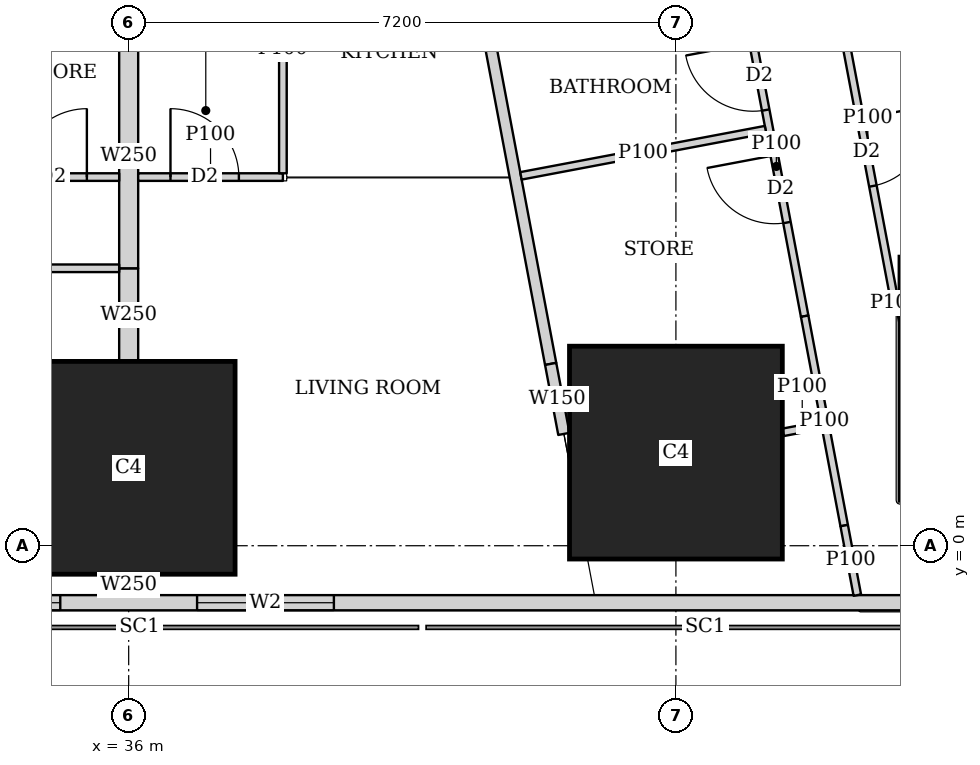
"""IFC4 building model, lengths in metres.
Left out: names, types, materials, properties, quantities, classifications, styles, units other than length and angle.
Written with IfcOpenShell. Run it as: python <this file> out.ifc"""

import sys

from ifc_helpers import new_model, si_unit, direction, frame, frame_2d, origin, origin_2d, place, context, subcontext, project, spatial, rectangle, extrude, element, fill, save


model = new_model("IFC4")
c1 = context("Model", 3, precision=1e-05, world=origin(), true_north=direction((0.0, 1.0)))
c2 = subcontext(c1, "Body", "Model", "MODEL_VIEW")
j1 = project(units=[si_unit("LENGTHUNIT", "METRE"), si_unit("PLANEANGLEUNIT", "RADIAN")], contexts=[c1])
p1 = place(None, origin())
s1 = spatial("IfcSite", under=j1, at=p1, CompositionType="ELEMENT")
p2 = place(p1, origin())
s2 = spatial("IfcBuilding", under=s1, at=p2, CompositionType="ELEMENT")
p3 = place(p2, frame((0.0, 0.0, 31.25)))
s3 = spatial("IfcBuildingStorey", under=s2, at=p3, CompositionType="ELEMENT", Elevation=31.25)
for number, where, z_axis, x_axis in (
    (1, (36.0, 1.025, 0.0), (0.0, 0.0, 1.0), (1.0, 0.0, 0.0)),
    (2, (43.2, 1.225, 0.0), (0.0, 0.0, 1.0), (1.0, 0.0, 0.0)),
):
    element("IfcColumn", number, at=place(p3, frame(where, z_axis=z_axis, x_axis=x_axis)), inside=s3, PredefinedType="COLUMN", context=c2, shape_type="SweptSolid", body=[
        extrude(rectangle(XDim=2.8, YDim=2.8, at=origin_2d()), origin(), (0.0, 0.0, 1.0), 3.75),
    ])
p4 = place(p3, frame((47.748, 2.197, 0.0), z_axis=(0.0, 0.0, 1.0), x_axis=(1.0, 0.0, 0.0)))
e3 = element("IfcColumn", 3, at=p4, inside=s3, PredefinedType="COLUMN", context=c2, shape_type="SweptSolid", body=[
    extrude(rectangle(XDim=3.2, YDim=3.2, at=origin_2d()), origin(), (0.0, 0.0, 1.0), 3.75),
])
p5 = place(p3, frame((2.163, -0.75, 0.0), z_axis=(0.0, 0.0, 1.0), x_axis=(1.0, 0.0, 0.0)))
e4 = element("IfcWall", 4, at=p5, inside=s3, PredefinedType="SOLIDWALL", context=c2, shape_type="SweptSolid", body=[
    extrude(rectangle(XDim=45.628, YDim=0.2, at=frame_2d((22.814, 0.0))), origin(), (0.0, 0.0, 1.0), 3.5),
])
p6 = place(p5, frame((9.537, 0.0, 0.9)))
e5 = element("IfcOpeningElement", 5, at=p6, cuts=e4, PredefinedType="OPENING", context=c2, shape_type="SweptSolid", body=[
    extrude(rectangle(XDim=1.8, YDim=1.5, at=frame_2d((0.9, 0.75))), frame((0.0, 0.11, 0.0), z_axis=(0.0, -1.0, 0.0), x_axis=(1.0, 0.0, 0.0)), (0.0, 0.0, 1.0), 0.22),
])
p7 = place(p5, frame((13.137, 0.0, 0.9)))
e6 = element("IfcOpeningElement", 6, at=p7, cuts=e4, PredefinedType="OPENING", context=c2, shape_type="SweptSolid", body=[
    extrude(rectangle(XDim=1.8, YDim=1.5, at=frame_2d((0.9, 0.75))), frame((0.0, 0.11, 0.0), z_axis=(0.0, -1.0, 0.0), x_axis=(1.0, 0.0, 0.0)), (0.0, 0.0, 1.0), 0.22),
])
p8 = place(p5, frame((16.737, 0.0, 0.9)))
e7 = element("IfcOpeningElement", 7, at=p8, cuts=e4, PredefinedType="OPENING", context=c2, shape_type="SweptSolid", body=[
    extrude(rectangle(XDim=1.8, YDim=1.5, at=frame_2d((0.9, 0.75))), frame((0.0, 0.11, 0.0), z_axis=(0.0, -1.0, 0.0), x_axis=(1.0, 0.0, 0.0)), (0.0, 0.0, 1.0), 0.22),
])
p9 = place(p5, frame((20.337, 0.0, 0.9)))
e8 = element("IfcOpeningElement", 8, at=p9, cuts=e4, PredefinedType="OPENING", context=c2, shape_type="SweptSolid", body=[
    extrude(rectangle(XDim=1.8, YDim=1.5, at=frame_2d((0.9, 0.75))), frame((0.0, 0.11, 0.0), z_axis=(0.0, -1.0, 0.0), x_axis=(1.0, 0.0, 0.0)), (0.0, 0.0, 1.0), 0.22),
])
p10 = place(p5, frame((23.937, 0.0, 0.9)))
e9 = element("IfcOpeningElement", 9, at=p10, cuts=e4, PredefinedType="OPENING", context=c2, shape_type="SweptSolid", body=[
    extrude(rectangle(XDim=1.8, YDim=1.5, at=frame_2d((0.9, 0.75))), frame((0.0, 0.11, 0.0), z_axis=(0.0, -1.0, 0.0), x_axis=(1.0, 0.0, 0.0)), (0.0, 0.0, 1.0), 0.22),
])
p11 = place(p5, frame((27.537, 0.0, 0.9)))
e10 = element("IfcOpeningElement", 10, at=p11, cuts=e4, PredefinedType="OPENING", context=c2, shape_type="SweptSolid", body=[
    extrude(rectangle(XDim=1.8, YDim=1.5, at=frame_2d((0.9, 0.75))), frame((0.0, 0.11, 0.0), z_axis=(0.0, -1.0, 0.0), x_axis=(1.0, 0.0, 0.0)), (0.0, 0.0, 1.0), 0.22),
])
p12 = place(p5, frame((31.137, 0.0, 0.9)))
e11 = element("IfcOpeningElement", 11, at=p12, cuts=e4, PredefinedType="OPENING", context=c2, shape_type="SweptSolid", body=[
    extrude(rectangle(XDim=1.8, YDim=1.5, at=frame_2d((0.9, 0.75))), frame((0.0, 0.11, 0.0), z_axis=(0.0, -1.0, 0.0), x_axis=(1.0, 0.0, 0.0)), (0.0, 0.0, 1.0), 0.22),
])
p13 = place(p5, frame((34.737, 0.0, 0.9)))
e12 = element("IfcOpeningElement", 12, at=p13, cuts=e4, PredefinedType="OPENING", context=c2, shape_type="SweptSolid", body=[
    extrude(rectangle(XDim=1.8, YDim=1.5, at=frame_2d((0.9, 0.75))), frame((0.0, 0.11, 0.0), z_axis=(0.0, -1.0, 0.0), x_axis=(1.0, 0.0, 0.0)), (0.0, 0.0, 1.0), 0.22),
])
p14 = place(p3, frame((50.653, 2.703, 0.0), z_axis=(0.0, 0.0, 1.0), x_axis=(-0.185612026696, 0.982623109613, 0.0)))
e13 = element("IfcWall", 13, at=p14, inside=s3, PredefinedType="SOLIDWALL", context=c2, shape_type="SweptSolid", body=[
    extrude(rectangle(XDim=41.393, YDim=0.2, at=frame_2d((20.697, 0.0))), origin(), (0.0, 0.0, 1.0), 3.5),
])
p15 = place(p14, frame((1.633, 0.0, 0.9)))
e14 = element("IfcOpeningElement", 14, at=p15, cuts=e13, PredefinedType="OPENING", context=c2, shape_type="SweptSolid", body=[
    extrude(rectangle(XDim=1.8, YDim=1.5, at=frame_2d((0.9, 0.75))), frame((0.0, 0.11, 0.0), z_axis=(0.0, -1.0, 0.0), x_axis=(1.0, 0.0, 0.0)), (0.0, 0.0, 1.0), 0.22),
])
p16 = place(p14, frame((6.032, 0.0, 0.9)))
e15 = element("IfcOpeningElement", 15, at=p16, cuts=e13, PredefinedType="OPENING", context=c2, shape_type="SweptSolid", body=[
    extrude(rectangle(XDim=1.8, YDim=1.5, at=frame_2d((0.9, 0.75))), frame((0.0, 0.11, 0.0), z_axis=(0.0, -1.0, 0.0), x_axis=(1.0, 0.0, 0.0)), (0.0, 0.0, 1.0), 0.22),
])
p17 = place(p14, frame((9.848, 0.0, 0.9)))
e16 = element("IfcOpeningElement", 16, at=p17, cuts=e13, PredefinedType="OPENING", context=c2, shape_type="SweptSolid", body=[
    extrude(rectangle(XDim=1.8, YDim=1.5, at=frame_2d((0.9, 0.75))), frame((0.0, 0.11, 0.0), z_axis=(0.0, -1.0, 0.0), x_axis=(1.0, 0.0, 0.0)), (0.0, 0.0, 1.0), 0.22),
])
p18 = place(p14, frame((17.481, 0.0, 0.9)))
e17 = element("IfcOpeningElement", 17, at=p18, cuts=e13, PredefinedType="OPENING", context=c2, shape_type="SweptSolid", body=[
    extrude(rectangle(XDim=1.8, YDim=1.5, at=frame_2d((0.9, 0.75))), frame((0.0, 0.11, 0.0), z_axis=(0.0, -1.0, 0.0), x_axis=(1.0, 0.0, 0.0)), (0.0, 0.0, 1.0), 0.22),
])
p19 = place(p14, frame((21.297, 0.0, 0.9)))
e18 = element("IfcOpeningElement", 18, at=p19, cuts=e13, PredefinedType="OPENING", context=c2, shape_type="SweptSolid", body=[
    extrude(rectangle(XDim=1.8, YDim=1.5, at=frame_2d((0.9, 0.75))), frame((0.0, 0.11, 0.0), z_axis=(0.0, -1.0, 0.0), x_axis=(1.0, 0.0, 0.0)), (0.0, 0.0, 1.0), 0.22),
])
p20 = place(p14, frame((25.113, 0.0, 0.9)))
e19 = element("IfcOpeningElement", 19, at=p20, cuts=e13, PredefinedType="OPENING", context=c2, shape_type="SweptSolid", body=[
    extrude(rectangle(XDim=1.8, YDim=1.5, at=frame_2d((0.9, 0.75))), frame((0.0, 0.11, 0.0), z_axis=(0.0, -1.0, 0.0), x_axis=(1.0, 0.0, 0.0)), (0.0, 0.0, 1.0), 0.22),
])
p21 = place(p14, frame((28.93, 0.0, 0.9)))
e20 = element("IfcOpeningElement", 20, at=p21, cuts=e13, PredefinedType="OPENING", context=c2, shape_type="SweptSolid", body=[
    extrude(rectangle(XDim=1.8, YDim=1.5, at=frame_2d((0.9, 0.75))), frame((0.0, 0.11, 0.0), z_axis=(0.0, -1.0, 0.0), x_axis=(1.0, 0.0, 0.0)), (0.0, 0.0, 1.0), 0.22),
])
p22 = place(p14, frame((32.746, 0.0, 0.9)))
e21 = element("IfcOpeningElement", 21, at=p22, cuts=e13, PredefinedType="OPENING", context=c2, shape_type="SweptSolid", body=[
    extrude(rectangle(XDim=1.8, YDim=1.5, at=frame_2d((0.9, 0.75))), frame((0.0, 0.11, 0.0), z_axis=(0.0, -1.0, 0.0), x_axis=(1.0, 0.0, 0.0)), (0.0, 0.0, 1.0), 0.22),
])
p23 = place(p14, frame((36.481, 0.0, 0.9)))
e22 = element("IfcOpeningElement", 22, at=p23, cuts=e13, PredefinedType="OPENING", context=c2, shape_type="SweptSolid", body=[
    extrude(rectangle(XDim=1.8, YDim=1.5, at=frame_2d((0.9, 0.75))), frame((0.0, 0.11, 0.0), z_axis=(0.0, -1.0, 0.0), x_axis=(1.0, 0.0, 0.0)), (0.0, 0.0, 1.0), 0.22),
])
p24 = place(p3, frame((35.094, 36.585, 0.0), z_axis=(0.0, 0.0, 1.0), x_axis=(0.185588860311, -0.982627485331, 0.0)))
e23 = element("IfcWall", 23, at=p24, inside=s3, PredefinedType="SOLIDWALL", context=c2, shape_type="SweptSolid", body=[
    extrude(rectangle(XDim=34.797, YDim=0.15, at=frame_2d((17.399, 0.0))), origin(), (0.0, 0.0, 1.0), 2.5),
])
p25 = place(p24, frame((6.012, 0.0, 0.0)))
e24 = element("IfcOpeningElement", 24, at=p25, cuts=e23, PredefinedType="OPENING", context=c2, shape_type="SweptSolid", body=[
    extrude(rectangle(XDim=1.0, YDim=2.1, at=frame_2d((0.5, 1.05))), frame((0.0, 0.085, 0.0), z_axis=(0.0, -1.0, 0.0), x_axis=(1.0, 0.0, 0.0)), (0.0, 0.0, 1.0), 0.17),
])
p26 = place(p24, frame((9.828, 0.0, 0.0)))
e25 = element("IfcOpeningElement", 25, at=p26, cuts=e23, PredefinedType="OPENING", context=c2, shape_type="SweptSolid", body=[
    extrude(rectangle(XDim=1.0, YDim=2.1, at=frame_2d((0.5, 1.05))), frame((0.0, 0.085, 0.0), z_axis=(0.0, -1.0, 0.0), x_axis=(1.0, 0.0, 0.0)), (0.0, 0.0, 1.0), 0.17),
])
p27 = place(p24, frame((25.9, 0.0, 0.0)))
e26 = element("IfcOpeningElement", 26, at=p27, cuts=e23, PredefinedType="OPENING", context=c2, shape_type="SweptSolid", body=[
    extrude(rectangle(XDim=1.0, YDim=2.1, at=frame_2d((0.5, 1.05))), frame((0.0, 0.085, 0.0), z_axis=(0.0, -1.0, 0.0), x_axis=(1.0, 0.0, 0.0)), (0.0, 0.0, 1.0), 0.17),
])
p28 = place(p3, frame((41.552, 2.392, 0.0), z_axis=(0.0, 0.0, 1.0), x_axis=(0.185687800081, -0.982608793417, 0.0)))
e27 = element("IfcWall", 27, at=p28, inside=s3, PredefinedType="SOLIDWALL", context=c2, shape_type="SweptSolid", body=[
    extrude(rectangle(XDim=0.938, YDim=0.15, at=frame_2d((0.469, 0.0))), origin(), (0.0, 0.0, 1.0), 2.05),
])
p29 = place(p3, frame((35.875, 3.65, 0.0), z_axis=(0.0, 0.0, 1.0), x_axis=(-1.0, 0.0, 0.0)))
e28 = element("IfcWall", 28, at=p29, inside=s3, PredefinedType="PARTITIONING", context=c2, shape_type="SweptSolid", body=[
    extrude(rectangle(XDim=7.075, YDim=0.1, at=frame_2d((3.538, 0.0))), origin(), (0.0, 0.0, 1.0), 3.5),
])
p30 = place(p29, frame((4.75, 0.0, 0.0)))
e29 = element("IfcOpeningElement", 29, at=p30, cuts=e28, PredefinedType="OPENING", context=c2, shape_type="SweptSolid", body=[
    extrude(rectangle(XDim=0.9, YDim=2.1, at=frame_2d((0.45, 1.05))), frame((0.0, 0.06, 0.0), z_axis=(0.0, -1.0, 0.0), x_axis=(1.0, 0.0, 0.0)), (0.0, 0.0, 1.0), 0.12),
])
p31 = place(p29, frame((2.375, 0.0, 0.0)))
e30 = element("IfcOpeningElement", 30, at=p31, cuts=e28, PredefinedType="OPENING", context=c2, shape_type="SweptSolid", body=[
    extrude(rectangle(XDim=0.9, YDim=2.1, at=frame_2d((0.45, 1.05))), frame((0.0, 0.06, 0.0), z_axis=(0.0, -1.0, 0.0), x_axis=(1.0, 0.0, 0.0)), (0.0, 0.0, 1.0), 0.12),
])
p32 = place(p3, frame((35.875, 4.85, 0.0), z_axis=(0.0, 0.0, 1.0), x_axis=(-1.0, 0.0, 0.0)))
e31 = element("IfcWall", 31, at=p32, inside=s3, PredefinedType="PARTITIONING", context=c2, shape_type="SweptSolid", body=[
    extrude(rectangle(XDim=7.075, YDim=0.1, at=frame_2d((3.538, 0.0))), origin(), (0.0, 0.0, 1.0), 3.5),
])
p33 = place(p32, frame((5.52, 0.0, 0.0)))
e32 = element("IfcOpeningElement", 32, at=p33, cuts=e31, PredefinedType="OPENING", context=c2, shape_type="SweptSolid", body=[
    extrude(rectangle(XDim=0.9, YDim=2.1, at=frame_2d((0.45, 1.05))), frame((0.0, 0.06, 0.0), z_axis=(0.0, -1.0, 0.0), x_axis=(1.0, 0.0, 0.0)), (0.0, 0.0, 1.0), 0.12),
])
p34 = place(p32, frame((2.225, 0.0, 0.0)))
e33 = element("IfcOpeningElement", 33, at=p34, cuts=e31, PredefinedType="OPENING", context=c2, shape_type="SweptSolid", body=[
    extrude(rectangle(XDim=0.9, YDim=2.1, at=frame_2d((0.45, 1.05))), frame((0.0, 0.06, 0.0), z_axis=(0.0, -1.0, 0.0), x_axis=(1.0, 0.0, 0.0)), (0.0, 0.0, 1.0), 0.12),
])
p35 = place(p32, frame((3.72, 0.0, 0.0)))
e34 = element("IfcOpeningElement", 34, at=p35, cuts=e31, PredefinedType="OPENING", context=c2, shape_type="SweptSolid", body=[
    extrude(rectangle(XDim=0.9, YDim=2.1, at=frame_2d((0.45, 1.05))), frame((0.0, 0.06, 0.0), z_axis=(0.0, -1.0, 0.0), x_axis=(1.0, 0.0, 0.0)), (0.0, 0.0, 1.0), 0.12),
])
p36 = place(p32, frame((0.425, 0.0, 0.0)))
e35 = element("IfcOpeningElement", 35, at=p36, cuts=e31, PredefinedType="OPENING", context=c2, shape_type="SweptSolid", body=[
    extrude(rectangle(XDim=0.9, YDim=2.1, at=frame_2d((0.45, 1.05))), frame((0.0, 0.06, 0.0), z_axis=(0.0, -1.0, 0.0), x_axis=(1.0, 0.0, 0.0)), (0.0, 0.0, 1.0), 0.12),
])
p37 = place(p3, frame((38.029, 4.85, 0.0), z_axis=(0.0, 0.0, 1.0), x_axis=(-1.0, 0.0, 0.0)))
e36 = element("IfcWall", 36, at=p37, inside=s3, PredefinedType="PARTITIONING", context=c2, shape_type="SweptSolid", body=[
    extrude(rectangle(XDim=1.904, YDim=0.1, at=frame_2d((0.952, 0.0))), origin(), (0.0, 0.0, 1.0), 3.5),
])
p38 = place(p37, frame((0.579, 0.0, 0.0)))
e37 = element("IfcOpeningElement", 37, at=p38, cuts=e36, PredefinedType="OPENING", context=c2, shape_type="SweptSolid", body=[
    extrude(rectangle(XDim=0.9, YDim=2.1, at=frame_2d((0.45, 1.05))), frame((0.0, 0.06, 0.0), z_axis=(0.0, -1.0, 0.0), x_axis=(1.0, 0.0, 0.0)), (0.0, 0.0, 1.0), 0.12),
])
p39 = place(p3, frame((38.029, 4.9, 0.0), z_axis=(0.0, 0.0, 1.0), x_axis=(0.0, 1.0, 0.0)))
e38 = element("IfcWall", 38, at=p39, inside=s3, PredefinedType="PARTITIONING", context=c2, shape_type="SweptSolid", body=[
    extrude(rectangle(XDim=3.275, YDim=0.1, at=frame_2d((1.638, 0.0))), origin(), (0.0, 0.0, 1.0), 3.5),
])
p40 = place(p3, frame((36.0, -0.65, 0.0), z_axis=(0.0, 0.0, 1.0), x_axis=(0.0, 1.0, 0.0)))
e39 = element("IfcWall", 39, at=p40, inside=s3, PredefinedType="SOLIDWALL", context=c2, shape_type="SweptSolid", body=[
    extrude(rectangle(XDim=0.274, YDim=0.25, at=frame_2d((0.137, 0.0))), origin(), (0.0, 0.0, 1.0), 3.5),
])
p41 = place(p3, frame((36.0, 2.426, 0.0), z_axis=(0.0, 0.0, 1.0), x_axis=(0.0, 1.0, 0.0)))
e40 = element("IfcWall", 40, at=p41, inside=s3, PredefinedType="SOLIDWALL", context=c2, shape_type="SweptSolid", body=[
    extrude(rectangle(XDim=1.224, YDim=0.25, at=frame_2d((0.612, 0.0))), origin(), (0.0, 0.0, 1.0), 3.5),
])
p42 = place(p3, frame((36.0, 3.65, 0.0), z_axis=(0.0, 0.0, 1.0), x_axis=(0.0, 1.0, 0.0)))
e41 = element("IfcWall", 41, at=p42, inside=s3, PredefinedType="SOLIDWALL", context=c2, shape_type="SweptSolid", body=[
    extrude(rectangle(XDim=2.949, YDim=0.25, at=frame_2d((1.475, 0.0))), origin(), (0.0, 0.0, 1.0), 3.5),
])
p43 = place(p3, frame((45.383, 6.894, 0.0), z_axis=(0.0, 0.0, 1.0), x_axis=(0.185791461635, -0.982589198385, 0.0)))
e42 = element("IfcWall", 42, at=p43, inside=s3, PredefinedType="PARTITIONING", context=c2, shape_type="SweptSolid", body=[
    extrude(rectangle(XDim=3.687, YDim=0.1, at=frame_2d((1.844, 0.0))), origin(), (0.0, 0.0, 1.0), 3.5),
])
p44 = place(p43, frame((1.3, 0.0, 0.0)))
e43 = element("IfcOpeningElement", 43, at=p44, cuts=e42, PredefinedType="OPENING", context=c2, shape_type="SweptSolid", body=[
    extrude(rectangle(XDim=0.9, YDim=2.1, at=frame_2d((0.45, 1.05))), frame((0.0, 0.06, 0.0), z_axis=(0.0, -1.0, 0.0), x_axis=(1.0, 0.0, 0.0)), (0.0, 0.0, 1.0), 0.12),
])
p45 = place(p3, frame((46.068, 3.271, 0.0), z_axis=(0.0, 0.0, 1.0), x_axis=(0.183590240121, -0.98300286049, 0.0)))
e44 = element("IfcWall", 44, at=p45, inside=s3, PredefinedType="PARTITIONING", context=c2, shape_type="SweptSolid", body=[
    extrude(rectangle(XDim=0.169, YDim=0.1, at=frame_2d((0.084, 0.0))), origin(), (0.0, 0.0, 1.0), 2.05),
])
p46 = place(p3, frame((44.149, 6.96, 0.0), z_axis=(0.0, 0.0, 1.0), x_axis=(0.185824941804, -0.982582867245, 0.0)))
e45 = element("IfcWall", 45, at=p46, inside=s3, PredefinedType="PARTITIONING", context=c2, shape_type="SweptSolid", body=[
    extrude(rectangle(XDim=4.01, YDim=0.1, at=frame_2d((2.005, 0.0))), origin(), (0.0, 0.0, 1.0), 3.5),
])
p47 = place(p46, frame((0.35, 0.0, 0.0)))
e46 = element("IfcOpeningElement", 46, at=p47, cuts=e45, PredefinedType="OPENING", context=c2, shape_type="SweptSolid", body=[
    extrude(rectangle(XDim=0.9, YDim=2.1, at=frame_2d((0.45, 1.05))), frame((0.0, 0.06, 0.0), z_axis=(0.0, -1.0, 0.0), x_axis=(1.0, 0.0, 0.0)), (0.0, 0.0, 1.0), 0.12),
])
p48 = place(p46, frame((1.856, 0.0, 0.0)))
e47 = element("IfcOpeningElement", 47, at=p48, cuts=e45, PredefinedType="OPENING", context=c2, shape_type="SweptSolid", body=[
    extrude(rectangle(XDim=0.9, YDim=2.1, at=frame_2d((0.45, 1.05))), frame((0.0, 0.06, 0.0), z_axis=(0.0, -1.0, 0.0), x_axis=(1.0, 0.0, 0.0)), (0.0, 0.0, 1.0), 0.12),
])
p49 = place(p3, frame((44.894, 3.02, 0.0), z_axis=(0.0, 0.0, 1.0), x_axis=(0.185471317237, -0.982649678412, 0.0)))
e48 = element("IfcWall", 48, at=p49, inside=s3, PredefinedType="PARTITIONING", context=c2, shape_type="SweptSolid", body=[
    extrude(rectangle(XDim=2.804, YDim=0.1, at=frame_2d((1.402, 0.0))), origin(), (0.0, 0.0, 1.0), 2.05),
])
p50 = place(p3, frame((45.414, 0.265, 0.0), z_axis=(0.0, 0.0, 1.0), x_axis=(0.185665855771, -0.982612940074, 0.0)))
e49 = element("IfcWall", 49, at=p50, inside=s3, PredefinedType="PARTITIONING", context=c2, shape_type="SweptSolid", body=[
    extrude(rectangle(XDim=0.931, YDim=0.1, at=frame_2d((0.465, 0.0))), origin(), (0.0, 0.0, 1.0), 3.5),
])
p51 = place(p3, frame((45.114, 1.587, 0.0), z_axis=(0.0, 0.0, 1.0), x_axis=(-0.982699277433, -0.185208342501, 0.0)))
e50 = element("IfcWall", 50, at=p51, inside=s3, PredefinedType="PARTITIONING", context=c2, shape_type="SweptSolid", body=[
    extrude(rectangle(XDim=0.513, YDim=0.1, at=frame_2d((0.256, 0.0))), origin(), (0.0, 0.0, 1.0), 2.05),
])
p52 = place(p3, frame((44.379, 5.474, 0.0), z_axis=(0.0, 0.0, 1.0), x_axis=(-0.982607026909, -0.185697147715, 0.0)))
e51 = element("IfcWall", 51, at=p52, inside=s3, PredefinedType="PARTITIONING", context=c2, shape_type="SweptSolid", body=[
    extrude(rectangle(XDim=3.275, YDim=0.1, at=frame_2d((1.637, 0.0))), origin(), (0.0, 0.0, 1.0), 3.5),
])
p53 = place(p12, origin())
e52 = element("IfcWindow", 52, at=p53, inside=s3, PartitioningType="SINGLE_PANEL", PredefinedType="WINDOW", context=c2, shape_type="SweptSolid", body=[
    extrude(rectangle(XDim=1.8, YDim=1.5, at=frame_2d((0.9, 0.75))), frame((0.0, 0.03, 0.0), z_axis=(0.0, -1.0, 0.0), x_axis=(1.0, 0.0, 0.0)), (0.0, 0.0, 1.0), 0.06),
])
fill(e11, e52)
p54 = place(p13, origin())
e53 = element("IfcWindow", 53, at=p54, inside=s3, PartitioningType="SINGLE_PANEL", PredefinedType="WINDOW", context=c2, shape_type="SweptSolid", body=[
    extrude(rectangle(XDim=1.8, YDim=1.5, at=frame_2d((0.9, 0.75))), frame((0.0, 0.03, 0.0), z_axis=(0.0, -1.0, 0.0), x_axis=(1.0, 0.0, 0.0)), (0.0, 0.0, 1.0), 0.06),
])
fill(e12, e53)
p55 = place(p36, origin())
e54 = element("IfcDoor", 54, at=p55, inside=s3, OperationType="SINGLE_SWING_RIGHT", PredefinedType="DOOR", context=c2, shape_type="SweptSolid", body=[
    extrude(rectangle(XDim=0.9, YDim=2.1, at=frame_2d((0.45, 1.05))), frame((0.0, 0.025, 0.0), z_axis=(0.0, -1.0, 0.0), x_axis=(1.0, 0.0, 0.0)), (0.0, 0.0, 1.0), 0.05),
])
fill(e35, e54)
p56 = place(p38, origin())
e55 = element("IfcDoor", 55, at=p56, inside=s3, OperationType="SINGLE_SWING_LEFT", PredefinedType="DOOR", context=c2, shape_type="SweptSolid", body=[
    extrude(rectangle(XDim=0.9, YDim=2.1, at=frame_2d((0.45, 1.05))), frame((0.0, 0.025, 0.0), z_axis=(0.0, -1.0, 0.0), x_axis=(1.0, 0.0, 0.0)), (0.0, 0.0, 1.0), 0.05),
])
fill(e37, e55)
p57 = place(p44, origin())
e56 = element("IfcDoor", 56, at=p57, inside=s3, OperationType="SINGLE_SWING_LEFT", PredefinedType="DOOR", context=c2, shape_type="SweptSolid", body=[
    extrude(rectangle(XDim=0.9, YDim=2.1, at=frame_2d((0.45, 1.05))), frame((0.0, 0.025, 0.0), z_axis=(0.0, -1.0, 0.0), x_axis=(1.0, 0.0, 0.0)), (0.0, 0.0, 1.0), 0.05),
])
fill(e43, e56)
p58 = place(p47, origin())
e57 = element("IfcDoor", 57, at=p58, inside=s3, OperationType="SINGLE_SWING_RIGHT", PredefinedType="DOOR", context=c2, shape_type="SweptSolid", body=[
    extrude(rectangle(XDim=0.9, YDim=2.1, at=frame_2d((0.45, 1.05))), frame((0.0, 0.025, 0.0), z_axis=(0.0, -1.0, 0.0), x_axis=(1.0, 0.0, 0.0)), (0.0, 0.0, 1.0), 0.05),
])
fill(e46, e57)
p59 = place(p48, origin())
e58 = element("IfcDoor", 58, at=p59, inside=s3, OperationType="SINGLE_SWING_RIGHT", PredefinedType="DOOR", context=c2, shape_type="SweptSolid", body=[
    extrude(rectangle(XDim=0.9, YDim=2.1, at=frame_2d((0.45, 1.05))), frame((0.0, 0.025, 0.0), z_axis=(0.0, -1.0, 0.0), x_axis=(1.0, 0.0, 0.0)), (0.0, 0.0, 1.0), 0.05),
])
fill(e47, e58)
save(model, sys.argv[1])
